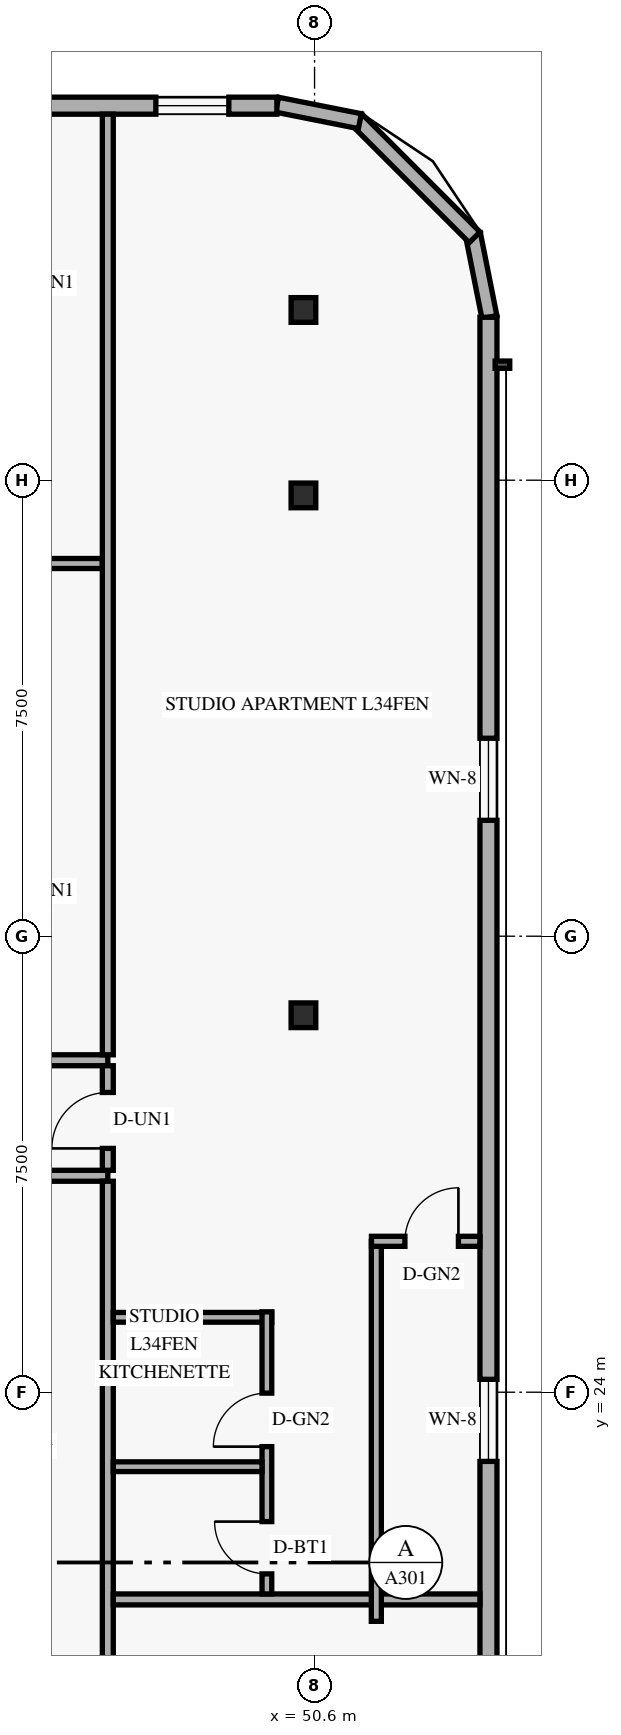
"""IFC4 building model, lengths in metres.
Left out: names, types, materials, properties, quantities, classifications, styles, units other than length and angle.
Written with IfcOpenShell. Run it as: python <this file> out.ifc"""

import sys

from ifc_helpers import new_model, si_unit, direction, frame, frame_2d, origin, origin_2d, place, context, subcontext, project, spatial, rectangle, hollow_rectangle, extrude, element, fill, save


model = new_model("IFC4")
c1 = context("Model", 3, precision=1e-05, world=origin(), true_north=direction((0.0, 1.0)))
c2 = subcontext(c1, "Body", "Model", "MODEL_VIEW")
j1 = project(units=[si_unit("LENGTHUNIT", "METRE"), si_unit("PLANEANGLEUNIT", "RADIAN")], contexts=[c1])
p1 = place(None, origin())
s1 = spatial("IfcSite", under=j1, at=p1, CompositionType="ELEMENT")
p2 = place(p1, origin())
s2 = spatial("IfcBuilding", under=s1, at=p2, CompositionType="ELEMENT")
p3 = place(p2, frame((0.0, 0.0, 132.0)))
s3 = spatial("IfcBuildingStorey", under=s2, at=p3, CompositionType="ELEMENT", Elevation=132.0)
for number, where, z_axis, x_axis in (
    (1, (50.313, 30.2, 0.0), (0.058, 0.0, 0.998), (0.0, 1.0, 0.0)),
    (2, (50.313, 38.75, 0.0), (0.058, 0.0, 0.998), (0.0, 1.0, 0.0)),
    (3, (50.313, 41.8, 0.0), (0.058, 0.0, 0.998), (0.0, 1.0, 0.0)),
):
    element("IfcColumn", number, at=place(p3, frame(where, z_axis=z_axis, x_axis=x_axis)), inside=s3, PredefinedType="COLUMN", context=c2, shape_type="SweptSolid", body=[
        extrude(hollow_rectangle(XDim=0.406, YDim=0.406, WallThickness=0.016, at=origin_2d()), origin(), (0.0, 0.0, 1.0), 3.606),
    ])
p4 = place(p3, frame((53.476, 41.684, 0.0), z_axis=(0.0, 0.0, 1.0), x_axis=(-0.195000137217, 0.980803214965, 0.0)))
e4 = element("IfcWall", 4, at=p4, inside=s3, PredefinedType="SOLIDWALL", context=c2, shape_type="SweptSolid", body=[
    extrude(rectangle(XDim=1.388, YDim=0.25, at=frame_2d((0.694, 0.0))), origin(), (0.0, 0.0, 1.0), 3.3),
])
p5 = place(p3, frame((53.232, 42.995, 0.0), z_axis=(0.0, 0.0, 1.0), x_axis=(-0.707151344399, 0.707062215165, 0.0)))
e5 = element("IfcWall", 5, at=p5, inside=s3, PredefinedType="SOLIDWALL", context=c2, shape_type="SweptSolid", body=[
    extrude(rectangle(XDim=2.739, YDim=0.25, at=frame_2d((1.37, 0.0))), origin(), (0.0, 0.0, 1.0), 3.3),
])
p6 = place(p3, frame((51.345, 44.905, 0.0), z_axis=(0.0, 0.0, 1.0), x_axis=(-0.980809899341, 0.19496651342, 0.0)))
e6 = element("IfcWall", 6, at=p6, inside=s3, PredefinedType="SOLIDWALL", context=c2, shape_type="SweptSolid", body=[
    extrude(rectangle(XDim=1.389, YDim=0.25, at=frame_2d((0.694, 0.0))), origin(), (0.0, 0.0, 1.0), 3.3),
])
p7 = place(p3, frame((53.46, 6.32, 0.0), z_axis=(0.0, 0.0, 1.0), x_axis=(0.0, 1.0, 0.0)))
e7 = element("IfcWall", 7, at=p7, inside=s3, PredefinedType="SOLIDWALL", context=c2, shape_type="SweptSolid", body=[
    extrude(rectangle(XDim=35.36, YDim=0.28, at=frame_2d((17.68, 0.0))), origin(), (0.0, 0.0, 1.0), 3.3),
])
p8 = place(p7, frame((6.461, 0.0, 0.85)))
e8 = element("IfcOpeningElement", 8, at=p8, cuts=e7, PredefinedType="OPENING", context=c2, shape_type="SweptSolid", body=[
    extrude(rectangle(XDim=1.35, YDim=1.55, at=frame_2d((0.675, 0.775))), frame((0.0, 0.15, 0.0), z_axis=(0.0, -1.0, 0.0), x_axis=(1.0, 0.0, 0.0)), (0.0, 0.0, 1.0), 0.3),
])
p9 = place(p7, frame((16.542, 0.0, 0.85)))
e9 = element("IfcOpeningElement", 9, at=p9, cuts=e7, PredefinedType="OPENING", context=c2, shape_type="SweptSolid", body=[
    extrude(rectangle(XDim=1.35, YDim=1.55, at=frame_2d((0.675, 0.775))), frame((0.0, 0.15, 0.0), z_axis=(0.0, -1.0, 0.0), x_axis=(1.0, 0.0, 0.0)), (0.0, 0.0, 1.0), 0.3),
])
p10 = place(p7, frame((27.086, 0.0, 0.85)))
e10 = element("IfcOpeningElement", 10, at=p10, cuts=e7, PredefinedType="OPENING", context=c2, shape_type="SweptSolid", body=[
    extrude(rectangle(XDim=1.35, YDim=1.55, at=frame_2d((0.675, 0.775))), frame((0.0, 0.15, 0.0), z_axis=(0.0, -1.0, 0.0), x_axis=(1.0, 0.0, 0.0)), (0.0, 0.0, 1.0), 0.3),
])
p11 = place(p3, frame((49.98, 45.16, 0.0), z_axis=(0.0, 0.0, 1.0), x_axis=(-1.0, 0.0, 0.0)))
e11 = element("IfcWall", 11, at=p11, inside=s3, PredefinedType="SOLIDWALL", context=c2, shape_type="SweptSolid", body=[
    extrude(rectangle(XDim=36.56, YDim=0.28, at=frame_2d((18.28, 0.0))), origin(), (0.0, 0.0, 1.0), 3.3),
])
p12 = place(p11, frame((31.845, 0.0, 0.85)))
e12 = element("IfcOpeningElement", 12, at=p12, cuts=e11, PredefinedType="OPENING", context=c2, shape_type="SweptSolid", body=[
    extrude(rectangle(XDim=1.2, YDim=1.5, at=frame_2d((0.6, 0.75))), frame((0.0, 0.15, 0.0), z_axis=(0.0, -1.0, 0.0), x_axis=(1.0, 0.0, 0.0)), (0.0, 0.0, 1.0), 0.3),
])
p13 = place(p11, frame((23.355, 0.0, 0.85)))
e13 = element("IfcOpeningElement", 13, at=p13, cuts=e11, PredefinedType="OPENING", context=c2, shape_type="SweptSolid", body=[
    extrude(rectangle(XDim=1.2, YDim=1.5, at=frame_2d((0.6, 0.75))), frame((0.0, 0.15, 0.0), z_axis=(0.0, -1.0, 0.0), x_axis=(1.0, 0.0, 0.0)), (0.0, 0.0, 1.0), 0.3),
])
p14 = place(p11, frame((16.47, 0.0, 0.85)))
e14 = element("IfcOpeningElement", 14, at=p14, cuts=e11, PredefinedType="OPENING", context=c2, shape_type="SweptSolid", body=[
    extrude(rectangle(XDim=1.2, YDim=1.5, at=frame_2d((0.6, 0.75))), frame((0.0, 0.15, 0.0), z_axis=(0.0, -1.0, 0.0), x_axis=(1.0, 0.0, 0.0)), (0.0, 0.0, 1.0), 0.3),
])
p15 = place(p11, frame((10.565, 0.0, 0.85)))
e15 = element("IfcOpeningElement", 15, at=p15, cuts=e11, PredefinedType="OPENING", context=c2, shape_type="SweptSolid", body=[
    extrude(rectangle(XDim=1.2, YDim=1.5, at=frame_2d((0.6, 0.75))), frame((0.0, 0.15, 0.0), z_axis=(0.0, -1.0, 0.0), x_axis=(1.0, 0.0, 0.0)), (0.0, 0.0, 1.0), 0.3),
])
p16 = place(p11, frame((4.675, 0.0, 0.85)))
e16 = element("IfcOpeningElement", 16, at=p16, cuts=e11, PredefinedType="OPENING", context=c2, shape_type="SweptSolid", body=[
    extrude(rectangle(XDim=1.2, YDim=1.5, at=frame_2d((0.6, 0.75))), frame((0.0, 0.15, 0.0), z_axis=(0.0, -1.0, 0.0), x_axis=(1.0, 0.0, 0.0)), (0.0, 0.0, 1.0), 0.3),
])
p17 = place(p11, frame((0.79, 0.0, 0.85)))
e17 = element("IfcOpeningElement", 17, at=p17, cuts=e11, PredefinedType="OPENING", context=c2, shape_type="SweptSolid", body=[
    extrude(rectangle(XDim=1.2, YDim=1.5, at=frame_2d((0.6, 0.75))), frame((0.0, 0.15, 0.0), z_axis=(0.0, -1.0, 0.0), x_axis=(1.0, 0.0, 0.0)), (0.0, 0.0, 1.0), 0.3),
])
p18 = place(p3, frame((37.64, 27.56, 0.0), z_axis=(0.0, 0.0, 1.0), x_axis=(1.0, 0.0, 0.0)))
e18 = element("IfcWall", 18, at=p18, inside=s3, PredefinedType="STANDARD", context=c2, shape_type="SweptSolid", body=[
    extrude(rectangle(XDim=9.56, YDim=0.18, at=frame_2d((4.78, 0.0))), origin(), (0.0, 0.0, 1.0), 2.671),
])
p19 = place(p3, frame((35.51, 29.46, 0.0), z_axis=(0.0, 0.0, 1.0), x_axis=(1.0, 0.0, 0.0)))
e19 = element("IfcWall", 19, at=p19, inside=s3, PredefinedType="STANDARD", context=c2, shape_type="SweptSolid", body=[
    extrude(rectangle(XDim=11.69, YDim=0.18, at=frame_2d((5.845, 0.0))), origin(), (0.0, 0.0, 1.0), 2.671),
])
p20 = place(p19, frame((0.32, 0.0, 0.0)))
e20 = element("IfcOpeningElement", 20, at=p20, cuts=e19, PredefinedType="OPENING", context=c2, shape_type="SweptSolid", body=[
    extrude(rectangle(XDim=0.92, YDim=2.15, at=frame_2d((0.46, 1.075))), frame((0.0, 0.1, 0.0), z_axis=(0.0, -1.0, 0.0), x_axis=(1.0, 0.0, 0.0)), (0.0, 0.0, 1.0), 0.2),
])
p21 = place(p3, frame((42.29, 37.63, 0.0), z_axis=(0.0, 0.0, 1.0), x_axis=(1.0, 0.0, 0.0)))
e21 = element("IfcWall", 21, at=p21, inside=s3, PredefinedType="PARTITIONING", context=c2, shape_type="SweptSolid", body=[
    extrude(rectangle(XDim=4.82, YDim=0.165, at=frame_2d((2.41, 0.0))), origin(), (0.0, 0.0, 1.0), 2.671),
])
p22 = place(p3, frame((47.2, 27.65, 0.0), z_axis=(0.0, 0.0, 1.0), x_axis=(0.0, 1.0, 0.0)))
e22 = element("IfcWall", 22, at=p22, inside=s3, PredefinedType="STANDARD", context=c2, shape_type="SweptSolid", body=[
    extrude(rectangle(XDim=1.72, YDim=0.18, at=frame_2d((0.86, 0.0))), origin(), (0.0, 0.0, 1.0), 3.3),
])
p23 = place(p22, frame((0.36, 0.0, 0.0)))
e23 = element("IfcOpeningElement", 23, at=p23, cuts=e22, PredefinedType="OPENING", context=c2, shape_type="SweptSolid", body=[
    extrude(rectangle(XDim=0.92, YDim=2.15, at=frame_2d((0.46, 1.075))), frame((0.0, 0.1, 0.0), z_axis=(0.0, -1.0, 0.0), x_axis=(1.0, 0.0, 0.0)), (0.0, 0.0, 1.0), 0.2),
])
p24 = place(p3, frame((47.2, 17.37, 0.0), z_axis=(0.0, 0.0, 1.0), x_axis=(0.0, 1.0, 0.0)))
e24 = element("IfcWall", 24, at=p24, inside=s3, PredefinedType="PARTITIONING", context=c2, shape_type="SweptSolid", body=[
    extrude(rectangle(XDim=10.1, YDim=0.18, at=frame_2d((5.05, 0.0))), origin(), (0.0, 0.0, 1.0), 2.671),
])
p25 = place(p3, frame((47.2, 29.55, 0.0), z_axis=(0.0, 0.0, 1.0), x_axis=(0.0, 1.0, 0.0)))
e25 = element("IfcWall", 25, at=p25, inside=s3, PredefinedType="PARTITIONING", context=c2, shape_type="SweptSolid", body=[
    extrude(rectangle(XDim=15.47, YDim=0.18, at=frame_2d((7.735, 0.0))), origin(), (0.0, 0.0, 1.0), 2.671),
])
p26 = place(p3, frame((47.29, 20.592, 0.0), z_axis=(0.0, 0.0, 1.0), x_axis=(1.0, 0.0, 0.0)))
e26 = element("IfcWall", 26, at=p26, inside=s3, PredefinedType="PARTITIONING", context=c2, shape_type="SweptSolid", body=[
    extrude(rectangle(XDim=6.03, YDim=0.18, at=frame_2d((3.015, 0.0))), origin(), (0.0, 0.0, 1.0), 2.749),
])
p27 = place(p3, frame((47.29, 25.232, 0.0), z_axis=(0.0, 0.0, 1.0), x_axis=(1.0, 0.0, 0.0)))
e27 = element("IfcWall", 27, at=p27, inside=s3, PredefinedType="PLUMBINGWALL", context=c2, shape_type="SweptSolid", body=[
    extrude(rectangle(XDim=2.606, YDim=0.16, at=frame_2d((1.303, 0.0))), origin(), (0.0, 0.0, 1.0), 3.3),
])
p28 = place(p3, frame((49.816, 20.682, 0.0), z_axis=(0.0, 0.0, 1.0), x_axis=(0.0, 1.0, 0.0)))
e28 = element("IfcWall", 28, at=p28, inside=s3, PredefinedType="PLUMBINGWALL", context=c2, shape_type="SweptSolid", body=[
    extrude(rectangle(XDim=4.64, YDim=0.16, at=frame_2d((2.32, 0.0))), origin(), (0.0, 0.0, 1.0), 3.3),
])
p29 = place(p28, frame((0.33, 0.0, 0.0)))
e29 = element("IfcOpeningElement", 29, at=p29, cuts=e28, PredefinedType="OPENING", context=c2, shape_type="SweptSolid", body=[
    extrude(rectangle(XDim=0.86, YDim=2.12, at=frame_2d((0.43, 1.06))), frame((0.0, 0.09, 0.0), z_axis=(0.0, -1.0, 0.0), x_axis=(1.0, 0.0, 0.0)), (0.0, 0.0, 1.0), 0.18),
])
p30 = place(p28, frame((2.423, 0.0, 0.0)))
e30 = element("IfcOpeningElement", 30, at=p30, cuts=e28, PredefinedType="OPENING", context=c2, shape_type="SweptSolid", body=[
    extrude(rectangle(XDim=0.88, YDim=2.12, at=frame_2d((0.44, 1.06))), frame((0.0, 0.09, 0.0), z_axis=(0.0, -1.0, 0.0), x_axis=(1.0, 0.0, 0.0)), (0.0, 0.0, 1.0), 0.18),
])
p31 = place(p3, frame((47.29, 22.775, 0.0), z_axis=(0.0, 0.0, 1.0), x_axis=(1.0, 0.0, 0.0)))
e31 = element("IfcWall", 31, at=p31, inside=s3, PredefinedType="PLUMBINGWALL", context=c2, shape_type="SweptSolid", body=[
    extrude(rectangle(XDim=2.446, YDim=0.16, at=frame_2d((1.223, 0.0))), origin(), (0.0, 0.0, 1.0), 3.3),
])
p32 = place(p3, frame((51.616, 20.232, 0.0), z_axis=(0.0, 0.0, 1.0), x_axis=(0.0, 1.0, 0.0)))
e32 = element("IfcWall", 32, at=p32, inside=s3, PredefinedType="PARTITIONING", context=c2, shape_type="SweptSolid", body=[
    extrude(rectangle(XDim=6.25, YDim=0.165, at=frame_2d((3.125, 0.0))), origin(), (0.0, 0.0, 1.0), 3.3),
])
p33 = place(p3, frame((51.536, 26.482, 0.0), z_axis=(0.0, 0.0, 1.0), x_axis=(1.0, 0.0, 0.0)))
e33 = element("IfcWall", 33, at=p33, inside=s3, PredefinedType="PARTITIONING", context=c2, shape_type="SweptSolid", body=[
    extrude(rectangle(XDim=1.784, YDim=0.165, at=frame_2d((0.892, 0.0))), origin(), (0.0, 0.0, 1.0), 3.3),
])
p34 = place(p33, frame((0.55, 0.0, 0.0)))
e34 = element("IfcOpeningElement", 34, at=p34, cuts=e33, PredefinedType="OPENING", context=c2, shape_type="SweptSolid", body=[
    extrude(rectangle(XDim=0.88, YDim=2.12, at=frame_2d((0.44, 1.06))), frame((0.0, 0.093, 0.0), z_axis=(0.0, -1.0, 0.0), x_axis=(1.0, 0.0, 0.0)), (0.0, 0.0, 1.0), 0.185),
])
p35 = place(p9, origin())
e35 = element("IfcWindow", 35, at=p35, inside=s3, PartitioningType="SINGLE_PANEL", PredefinedType="WINDOW", context=c2, shape_type="SweptSolid", body=[
    extrude(rectangle(XDim=1.35, YDim=1.55, at=frame_2d((0.675, 0.775))), frame((0.0, 0.03, 0.0), z_axis=(0.0, -1.0, 0.0), x_axis=(1.0, 0.0, 0.0)), (0.0, 0.0, 1.0), 0.06),
])
fill(e9, e35)
p36 = place(p10, origin())
e36 = element("IfcWindow", 36, at=p36, inside=s3, PartitioningType="SINGLE_PANEL", PredefinedType="WINDOW", context=c2, shape_type="SweptSolid", body=[
    extrude(rectangle(XDim=1.35, YDim=1.55, at=frame_2d((0.675, 0.775))), frame((0.0, 0.03, 0.0), z_axis=(0.0, -1.0, 0.0), x_axis=(1.0, 0.0, 0.0)), (0.0, 0.0, 1.0), 0.06),
])
fill(e10, e36)
p37 = place(p17, origin())
e37 = element("IfcWindow", 37, at=p37, inside=s3, PartitioningType="SINGLE_PANEL", PredefinedType="WINDOW", context=c2, shape_type="SweptSolid", body=[
    extrude(rectangle(XDim=1.2, YDim=1.5, at=frame_2d((0.6, 0.75))), frame((0.0, 0.03, 0.0), z_axis=(0.0, -1.0, 0.0), x_axis=(1.0, 0.0, 0.0)), (0.0, 0.0, 1.0), 0.06),
])
fill(e17, e37)
p38 = place(p34, origin())
e38 = element("IfcDoor", 38, at=p38, inside=s3, OperationType="SINGLE_SWING_RIGHT", PredefinedType="DOOR", context=c2, shape_type="SweptSolid", body=[
    extrude(rectangle(XDim=0.88, YDim=2.12, at=frame_2d((0.44, 1.06))), frame((0.0, 0.025, 0.0), z_axis=(0.0, -1.0, 0.0), x_axis=(1.0, 0.0, 0.0)), (0.0, 0.0, 1.0), 0.05),
])
fill(e34, e38)
p39 = place(p23, origin())
e39 = element("IfcDoor", 39, at=p39, inside=s3, OperationType="SINGLE_SWING_LEFT", PredefinedType="DOOR", context=c2, shape_type="SweptSolid", body=[
    extrude(rectangle(XDim=0.92, YDim=2.15, at=frame_2d((0.46, 1.075))), frame((0.0, 0.025, 0.0), z_axis=(0.0, -1.0, 0.0), x_axis=(1.0, 0.0, 0.0)), (0.0, 0.0, 1.0), 0.05),
])
fill(e23, e39)
p40 = place(p29, origin())
e40 = element("IfcDoor", 40, at=p40, inside=s3, OperationType="SINGLE_SWING_RIGHT", PredefinedType="DOOR", context=c2, shape_type="SweptSolid", body=[
    extrude(rectangle(XDim=0.86, YDim=2.12, at=frame_2d((0.43, 1.06))), frame((0.0, 0.025, 0.0), z_axis=(0.0, -1.0, 0.0), x_axis=(1.0, 0.0, 0.0)), (0.0, 0.0, 1.0), 0.05),
])
fill(e29, e40)
p41 = place(p30, origin())
e41 = element("IfcDoor", 41, at=p41, inside=s3, OperationType="SINGLE_SWING_LEFT", PredefinedType="DOOR", context=c2, shape_type="SweptSolid", body=[
    extrude(rectangle(XDim=0.88, YDim=2.12, at=frame_2d((0.44, 1.06))), frame((0.0, 0.025, 0.0), z_axis=(0.0, -1.0, 0.0), x_axis=(1.0, 0.0, 0.0)), (0.0, 0.0, 1.0), 0.05),
])
fill(e30, e41)
save(model, sys.argv[1])
